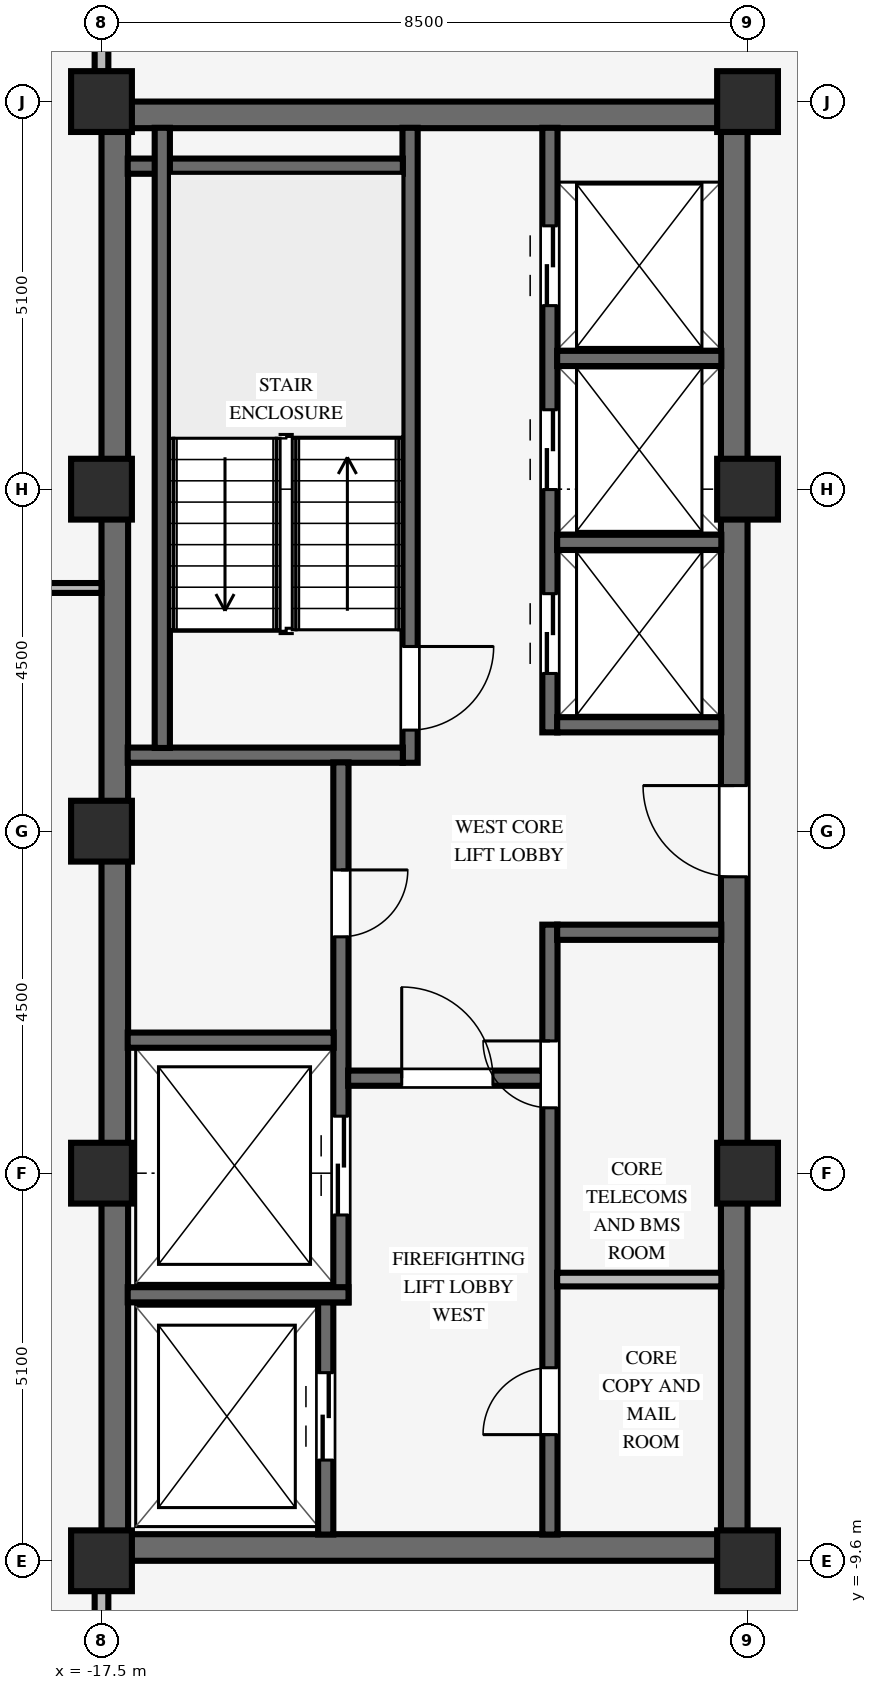
"""IFC4 building model, lengths in metres.
Left out: names, types, materials, properties, quantities, classifications, styles, units other than length and angle.
Written with IfcOpenShell. Run it as: python <this file> out.ifc"""

import sys

from ifc_helpers import new_model, si_unit, direction, frame, frame_2d, origin, origin_2d, place, context, subcontext, project, spatial, rectangle, extrude, source, transform, mapped, element, fill, save


model = new_model("IFC4")
c1 = context("Model", 3, precision=1e-05, world=origin(), true_north=direction((0.0, 1.0)))
c2 = subcontext(c1, "Body", "Model", "MODEL_VIEW")
j1 = project(units=[si_unit("LENGTHUNIT", "METRE"), si_unit("PLANEANGLEUNIT", "RADIAN")], contexts=[c1])
p1 = place(None, origin())
s1 = spatial("IfcSite", under=j1, at=p1, CompositionType="ELEMENT")
p2 = place(p1, origin())
s2 = spatial("IfcBuilding", under=s1, at=p2, CompositionType="ELEMENT")
p3 = place(p2, frame((0.0, 0.0, 242.0)))
s3 = spatial("IfcBuildingStorey", under=s2, at=p3, CompositionType="ELEMENT", Elevation=242.0)
for number, where, z_axis, x_axis in (
    (1, (-17.5, -9.425, 0.0), (0.0, 0.0, 1.0), (1.0, 0.0, 0.0)),
    (2, (-17.5, 9.425, 0.0), (0.0, 0.0, 1.0), (1.0, 0.0, 0.0)),
):
    element("IfcWall", number, at=place(p3, frame(where, z_axis=z_axis, x_axis=x_axis)), inside=s3, PredefinedType="SHEAR", context=c2, shape_type="SweptSolid", body=[
        extrude(rectangle(XDim=8.5, YDim=0.35, at=frame_2d((4.25, 0.0))), origin(), (0.0, 0.0, 1.0), 3.25),
    ])
p4 = place(p3, frame((-17.325, -9.255, 0.0), z_axis=(0.0, 0.0, 1.0), x_axis=(0.0, 1.0, 0.0)))
e3 = element("IfcWall", 3, at=p4, inside=s3, PredefinedType="SHEAR", context=c2, shape_type="SweptSolid", body=[
    extrude(rectangle(XDim=18.51, YDim=0.35, at=frame_2d((9.255, 0.0))), origin(), (0.0, 0.0, 1.0), 3.25),
])
p5 = place(p3, frame((-9.175, -9.255, 0.0), z_axis=(0.0, 0.0, 1.0), x_axis=(0.0, 1.0, 0.0)))
e4 = element("IfcWall", 4, at=p5, inside=s3, PredefinedType="SHEAR", context=c2, shape_type="SweptSolid", body=[
    extrude(rectangle(XDim=18.51, YDim=0.35, at=frame_2d((9.255, 0.0))), origin(), (0.0, 0.0, 1.0), 3.25),
])
p6 = place(p5, frame((8.655, 0.0, 0.0)))
e5 = element("IfcOpeningElement", 5, at=p6, cuts=e4, PredefinedType="OPENING", context=c2, shape_type="SweptSolid", body=[
    extrude(rectangle(XDim=1.2, YDim=2.15, at=frame_2d((0.6, 1.075))), frame((0.0, 0.185, 0.0), z_axis=(0.0, -1.0, 0.0), x_axis=(1.0, 0.0, 0.0)), (0.0, 0.0, 1.0), 0.37),
])
for number, where, z_axis, x_axis in (
    (6, (-17.5, -9.6, 0.0), (0.0, 0.0, 1.0), (1.0, 0.0, 0.0)),
    (7, (-17.5, -4.5, 0.0), (0.0, 0.0, 1.0), (1.0, 0.0, 0.0)),
    (8, (-17.5, 4.5, 0.0), (0.0, 0.0, 1.0), (1.0, 0.0, 0.0)),
    (9, (-17.5, 9.6, 0.0), (0.0, 0.0, 1.0), (1.0, 0.0, 0.0)),
    (10, (-9.0, -9.6, 0.0), (0.0, 0.0, 1.0), (1.0, 0.0, 0.0)),
    (11, (-9.0, -4.5, 0.0), (0.0, 0.0, 1.0), (1.0, 0.0, 0.0)),
    (12, (-9.0, 4.5, 0.0), (0.0, 0.0, 1.0), (1.0, 0.0, 0.0)),
    (13, (-9.0, 9.6, 0.0), (0.0, 0.0, 1.0), (1.0, 0.0, 0.0)),
    (14, (-17.5, 0.0, 0.0), (0.0, 0.0, 1.0), (1.0, 0.0, 0.0)),
):
    element("IfcColumn", number, at=place(p3, frame(where, z_axis=z_axis, x_axis=x_axis)), inside=s3, PredefinedType="COLUMN", context=c2, shape_type="SweptSolid", body=[
        extrude(rectangle(XDim=0.8, YDim=0.8, at=origin_2d()), origin(), (0.0, 0.0, 1.0), 3.25),
    ])
p7 = place(p3, frame((-13.44, 0.9, 0.0), z_axis=(0.0, 0.0, 1.0), x_axis=(0.0, 1.0, 0.0)))
e15 = element("IfcWall", 15, at=p7, inside=s3, PredefinedType="SHEAR", context=c2, shape_type="SweptSolid", body=[
    extrude(rectangle(XDim=8.355, YDim=0.2, at=frame_2d((4.177, 0.0))), origin(), (0.0, 0.0, 1.0), 3.25),
])
p8 = place(p7, frame((1.53, 0.0, 0.0), z_axis=(0.0, 0.0, 1.0), x_axis=(-1.0, 0.0, 0.0)))
e16 = element("IfcOpeningElement", 16, at=p8, cuts=e15, PredefinedType="OPENING", context=c2, shape_type="SweptSolid", body=[
    extrude(rectangle(XDim=1.1, YDim=2.15, at=frame_2d((0.55, 1.075))), frame((0.0, 0.11, 0.0), z_axis=(0.0, -1.0, 0.0), x_axis=(1.0, 0.0, 0.0)), (0.0, 0.0, 1.0), 0.22),
])
for number, where, z_axis, x_axis in (
    (17, (-17.155, 1.0, 0.0), (0.0, 0.0, 1.0), (1.0, 0.0, 0.0)),
    (18, (-17.155, 8.75, 0.0), (0.0, 0.0, 1.0), (1.0, 0.0, 0.0)),
):
    element("IfcWall", number, at=place(p3, frame(where, z_axis=z_axis, x_axis=x_axis)), inside=s3, PredefinedType="SHEAR", context=c2, shape_type="SweptSolid", body=[
        extrude(rectangle(XDim=3.62, YDim=0.2, at=frame_2d((1.81, 0.0))), origin(), (0.0, 0.0, 1.0), 3.25),
    ])
p9 = place(p3, frame((-16.7, 1.095, 0.0), z_axis=(0.0, 0.0, 1.0), x_axis=(0.0, 1.0, 0.0)))
e19 = element("IfcWall", 19, at=p9, inside=s3, PredefinedType="SHEAR", context=c2, shape_type="SweptSolid", body=[
    extrude(rectangle(XDim=8.16, YDim=0.2, at=frame_2d((4.08, 0.0))), origin(), (0.0, 0.0, 1.0), 3.25),
])
p10 = place(p3, frame((-14.55, -9.255, 0.0), z_axis=(0.0, 0.0, 1.0), x_axis=(0.0, 1.0, 0.0)))
e20 = element("IfcWall", 20, at=p10, inside=s3, PredefinedType="SHEAR", context=c2, shape_type="SweptSolid", body=[
    extrude(rectangle(XDim=3.06, YDim=0.2, at=frame_2d((1.53, 0.0))), origin(), (0.0, 0.0, 1.0), 3.25),
])
p11 = place(p10, frame((0.98, 0.0, 0.0)))
e21 = element("IfcOpeningElement", 21, at=p11, cuts=e20, PredefinedType="OPENING", context=c2, shape_type="SweptSolid", body=[
    extrude(rectangle(XDim=1.15, YDim=2.15, at=frame_2d((0.575, 1.075))), frame((0.0, 0.11, 0.0), z_axis=(0.0, -1.0, 0.0), x_axis=(1.0, 0.0, 0.0)), (0.0, 0.0, 1.0), 0.22),
])
p12 = place(p3, frame((-14.35, -6.2, 0.0), z_axis=(0.0, 0.0, 1.0), x_axis=(0.0, 1.0, 0.0)))
e22 = element("IfcWall", 22, at=p12, inside=s3, PredefinedType="SHEAR", context=c2, shape_type="SweptSolid", body=[
    extrude(rectangle(XDim=7.105, YDim=0.2, at=frame_2d((3.552, 0.0))), origin(), (0.0, 0.0, 1.0), 3.25),
])
p13 = place(p12, frame((5.69, 0.0, 0.0), z_axis=(0.0, 0.0, 1.0), x_axis=(-1.0, 0.0, 0.0)))
e23 = element("IfcOpeningElement", 23, at=p13, cuts=e22, PredefinedType="OPENING", context=c2, shape_type="SweptSolid", body=[
    extrude(rectangle(XDim=0.88, YDim=2.1, at=frame_2d((0.44, 1.05))), frame((0.0, 0.11, 0.0), z_axis=(0.0, -1.0, 0.0), x_axis=(1.0, 0.0, 0.0)), (0.0, 0.0, 1.0), 0.22),
])
p14 = place(p12, frame((1.15, 0.0, 0.0)))
e24 = element("IfcOpeningElement", 24, at=p14, cuts=e22, PredefinedType="OPENING", context=c2, shape_type="SweptSolid", body=[
    extrude(rectangle(XDim=1.3, YDim=2.2, at=frame_2d((0.65, 1.1))), frame((0.0, 0.11, 0.0), z_axis=(0.0, -1.0, 0.0), x_axis=(1.0, 0.0, 0.0)), (0.0, 0.0, 1.0), 0.22),
])
p15 = place(p3, frame((-17.155, -6.1, 0.0), z_axis=(0.0, 0.0, 1.0), x_axis=(1.0, 0.0, 0.0)))
e25 = element("IfcWall", 25, at=p15, inside=s3, PredefinedType="SHEAR", context=c2, shape_type="SweptSolid", body=[
    extrude(rectangle(XDim=2.905, YDim=0.2, at=frame_2d((1.453, 0.0))), origin(), (0.0, 0.0, 1.0), 3.25),
])
p16 = place(p3, frame((-17.155, -2.75, 0.0), z_axis=(0.0, 0.0, 1.0), x_axis=(1.0, 0.0, 0.0)))
e26 = element("IfcWall", 26, at=p16, inside=s3, PredefinedType="SHEAR", context=c2, shape_type="SweptSolid", body=[
    extrude(rectangle(XDim=2.71, YDim=0.2, at=frame_2d((1.355, 0.0))), origin(), (0.0, 0.0, 1.0), 3.25),
])
p17 = place(p3, frame((-11.6, -9.255, 0.0), z_axis=(0.0, 0.0, 1.0), x_axis=(0.0, 1.0, 0.0)))
e27 = element("IfcWall", 27, at=p17, inside=s3, PredefinedType="SHEAR", context=c2, shape_type="SweptSolid", body=[
    extrude(rectangle(XDim=8.025, YDim=0.2, at=frame_2d((4.012, 0.0))), origin(), (0.0, 0.0, 1.0), 3.25),
])
p18 = place(p17, frame((1.315, 0.0, 0.0)))
e28 = element("IfcOpeningElement", 28, at=p18, cuts=e27, PredefinedType="OPENING", context=c2, shape_type="SweptSolid", body=[
    extrude(rectangle(XDim=0.88, YDim=2.1, at=frame_2d((0.44, 1.05))), frame((0.0, 0.11, 0.0), z_axis=(0.0, -1.0, 0.0), x_axis=(1.0, 0.0, 0.0)), (0.0, 0.0, 1.0), 0.22),
])
p19 = place(p17, frame((5.615, 0.0, 0.0)))
e29 = element("IfcOpeningElement", 29, at=p19, cuts=e27, PredefinedType="OPENING", context=c2, shape_type="SweptSolid", body=[
    extrude(rectangle(XDim=0.88, YDim=2.1, at=frame_2d((0.44, 1.05))), frame((0.0, 0.11, 0.0), z_axis=(0.0, -1.0, 0.0), x_axis=(1.0, 0.0, 0.0)), (0.0, 0.0, 1.0), 0.22),
])
p20 = place(p3, frame((-14.255, -3.25, 0.0), z_axis=(0.0, 0.0, 1.0), x_axis=(1.0, 0.0, 0.0)))
e30 = element("IfcWall", 30, at=p20, inside=s3, PredefinedType="SHEAR", context=c2, shape_type="SweptSolid", body=[
    extrude(rectangle(XDim=2.56, YDim=0.2, at=frame_2d((1.28, 0.0))), origin(), (0.0, 0.0, 1.0), 3.25),
])
p21 = place(p20, frame((0.705, 0.0, 0.0)))
e31 = element("IfcOpeningElement", 31, at=p21, cuts=e30, PredefinedType="OPENING", context=c2, shape_type="SweptSolid", body=[
    extrude(rectangle(XDim=1.2, YDim=2.15, at=frame_2d((0.6, 1.075))), frame((0.0, 0.11, 0.0), z_axis=(0.0, -1.0, 0.0), x_axis=(1.0, 0.0, 0.0)), (0.0, 0.0, 1.0), 0.22),
])
p22 = place(p3, frame((-11.505, -1.33, 0.0), z_axis=(0.0, 0.0, 1.0), x_axis=(1.0, 0.0, 0.0)))
e32 = element("IfcWall", 32, at=p22, inside=s3, PredefinedType="SHEAR", context=c2, shape_type="SweptSolid", body=[
    extrude(rectangle(XDim=2.16, YDim=0.2, at=frame_2d((1.08, 0.0))), origin(), (0.0, 0.0, 1.0), 3.25),
])
p23 = place(p3, frame((-11.505, -5.9, 0.0), z_axis=(0.0, 0.0, 1.0), x_axis=(1.0, 0.0, 0.0)))
e33 = element("IfcWall", 33, at=p23, inside=s3, PredefinedType="PARTITIONING", context=c2, shape_type="SweptSolid", body=[
    extrude(rectangle(XDim=2.16, YDim=0.18, at=frame_2d((1.08, 0.0))), origin(), (0.0, 0.0, 1.0), 3.24),
])
p24 = place(p3, frame((-11.6, 1.3, 0.0), z_axis=(0.0, 0.0, 1.0), x_axis=(0.0, 1.0, 0.0)))
e34 = element("IfcWall", 34, at=p24, inside=s3, PredefinedType="SHEAR", context=c2, shape_type="SweptSolid", body=[
    extrude(rectangle(XDim=7.955, YDim=0.2, at=frame_2d((3.978, 0.0))), origin(), (0.0, 0.0, 1.0), 3.25),
])
p25 = place(p24, frame((0.775, 0.0, 0.0)))
e35 = element("IfcOpeningElement", 35, at=p25, cuts=e34, PredefinedType="OPENING", context=c2, shape_type="SweptSolid", body=[
    extrude(rectangle(XDim=1.05, YDim=2.15, at=frame_2d((0.525, 1.075))), frame((0.0, 0.11, 0.0), z_axis=(0.0, -1.0, 0.0), x_axis=(1.0, 0.0, 0.0)), (0.0, 0.0, 1.0), 0.22),
])
p26 = place(p24, frame((3.195, 0.0, 0.0)))
e36 = element("IfcOpeningElement", 36, at=p26, cuts=e34, PredefinedType="OPENING", context=c2, shape_type="SweptSolid", body=[
    extrude(rectangle(XDim=1.05, YDim=2.15, at=frame_2d((0.525, 1.075))), frame((0.0, 0.11, 0.0), z_axis=(0.0, -1.0, 0.0), x_axis=(1.0, 0.0, 0.0)), (0.0, 0.0, 1.0), 0.22),
])
p27 = place(p24, frame((5.615, 0.0, 0.0)))
e37 = element("IfcOpeningElement", 37, at=p27, cuts=e34, PredefinedType="OPENING", context=c2, shape_type="SweptSolid", body=[
    extrude(rectangle(XDim=1.05, YDim=2.15, at=frame_2d((0.525, 1.075))), frame((0.0, 0.11, 0.0), z_axis=(0.0, -1.0, 0.0), x_axis=(1.0, 0.0, 0.0)), (0.0, 0.0, 1.0), 0.22),
])
for number, where, z_axis, x_axis in (
    (38, (-11.505, 1.4, 0.0), (0.0, 0.0, 1.0), (1.0, 0.0, 0.0)),
    (39, (-11.505, 3.8, 0.0), (0.0, 0.0, 1.0), (1.0, 0.0, 0.0)),
    (40, (-11.505, 6.22, 0.0), (0.0, 0.0, 1.0), (1.0, 0.0, 0.0)),
):
    element("IfcWall", number, at=place(p3, frame(where, z_axis=z_axis, x_axis=x_axis)), inside=s3, PredefinedType="SHEAR", context=c2, shape_type="SweptSolid", body=[
        extrude(rectangle(XDim=2.16, YDim=0.2, at=frame_2d((1.08, 0.0))), origin(), (0.0, 0.0, 1.0), 3.25),
    ])
p28 = place(p3, frame((-26.1, 3.2, 0.0), z_axis=(0.0, 0.0, 1.0), x_axis=(1.0, 0.0, 0.0)))
e41 = element("IfcWall", 41, at=p28, inside=s3, PredefinedType="PARTITIONING", context=c2, shape_type="SweptSolid", body=[
    extrude(rectangle(XDim=8.6, YDim=0.13, at=frame_2d((4.3, 0.0))), origin(), (0.0, 0.0, 1.0), 3.24),
])
for number, where, z_axis, x_axis in (
    (42, (-17.5, -11.114, 0.0), (0.0, 0.0, 1.0), (0.0, 1.0, 0.0)),
    (43, (-17.5, 9.996, 0.0), (0.0, 0.0, 1.0), (0.0, 1.0, 0.0)),
):
    element("IfcWall", number, at=place(p3, frame(where, z_axis=z_axis, x_axis=x_axis)), inside=s3, PredefinedType="PARTITIONING", context=c2, shape_type="SweptSolid", body=[
        extrude(rectangle(XDim=1.118, YDim=0.18, at=frame_2d((0.559, 0.0))), origin(), (0.0, 0.0, 1.0), 2.772),
    ])
m1 = source(origin(), c2, "Body", "SweptSolid", [
    extrude(rectangle(XDim=1.1, YDim=2.15, at=frame_2d((0.55, 1.075))), frame((0.0, 0.025, 0.0), z_axis=(0.0, -1.0, 0.0), x_axis=(1.0, 0.0, 0.0)), (0.0, 0.0, 1.0), 0.05),
])
p29 = place(p8, origin())
e44 = element("IfcDoor", 44, at=p29, inside=s3, OperationType="SINGLE_SWING_LEFT", PredefinedType="DOOR", context=c2, shape_type="MappedRepresentation", body=[
    mapped(m1, transform((0.0, 0.0, 0.0), scale=1.0)),
])
fill(e16, e44)
m2 = source(origin(), c2, "Body", "SweptSolid", [
    extrude(rectangle(XDim=0.88, YDim=2.1, at=frame_2d((0.44, 1.05))), frame((0.0, 0.025, 0.0), z_axis=(0.0, -1.0, 0.0), x_axis=(1.0, 0.0, 0.0)), (0.0, 0.0, 1.0), 0.05),
])
p30 = place(p13, origin())
e45 = element("IfcDoor", 45, at=p30, inside=s3, OperationType="SINGLE_SWING_LEFT", PredefinedType="DOOR", context=c2, shape_type="MappedRepresentation", body=[
    mapped(m2, transform((0.0, 0.0, 0.0), scale=1.0)),
])
fill(e23, e45)
m3 = source(origin(), c2, "Body", "SweptSolid", [
    extrude(rectangle(XDim=1.2, YDim=2.15, at=frame_2d((0.6, 1.075))), frame((0.0, 0.025, 0.0), z_axis=(0.0, -1.0, 0.0), x_axis=(1.0, 0.0, 0.0)), (0.0, 0.0, 1.0), 0.05),
])
p31 = place(p21, origin())
e46 = element("IfcDoor", 46, at=p31, inside=s3, OperationType="SINGLE_SWING_LEFT", PredefinedType="DOOR", context=c2, shape_type="MappedRepresentation", body=[
    mapped(m3, transform((0.0, 0.0, 0.0), scale=1.0)),
])
fill(e31, e46)
p32 = place(p18, origin())
e47 = element("IfcDoor", 47, at=p32, inside=s3, OperationType="SINGLE_SWING_LEFT", PredefinedType="DOOR", context=c2, shape_type="MappedRepresentation", body=[
    mapped(m2, transform((0.0, 0.0, 0.0), scale=1.0)),
])
fill(e28, e47)
p33 = place(p19, origin())
e48 = element("IfcDoor", 48, at=p33, inside=s3, OperationType="SINGLE_SWING_RIGHT", PredefinedType="DOOR", context=c2, shape_type="MappedRepresentation", body=[
    mapped(m2, transform((0.0, 0.0, 0.0), scale=1.0)),
])
fill(e29, e48)
p34 = place(p6, origin())
e49 = element("IfcDoor", 49, at=p34, inside=s3, OperationType="SINGLE_SWING_RIGHT", PredefinedType="DOOR", context=c2, shape_type="MappedRepresentation", body=[
    mapped(m3, transform((0.0, 0.0, 0.0), scale=1.0)),
])
fill(e5, e49)
m4 = source(origin(), c2, "Body", "SweptSolid", [
    extrude(rectangle(XDim=1.15, YDim=2.15, at=frame_2d((0.575, 1.075))), frame((0.0, 0.025, 0.0), z_axis=(0.0, -1.0, 0.0), x_axis=(1.0, 0.0, 0.0)), (0.0, 0.0, 1.0), 0.05),
])
p35 = place(p11, origin())
e50 = element("IfcDoor", 50, at=p35, inside=s3, OperationType="DOUBLE_DOOR_SLIDING", PredefinedType="DOOR", context=c2, shape_type="MappedRepresentation", body=[
    mapped(m4, transform((0.0, 0.0, 0.0), scale=1.0)),
])
fill(e21, e50)
m5 = source(origin(), c2, "Body", "SweptSolid", [
    extrude(rectangle(XDim=1.3, YDim=2.2, at=frame_2d((0.65, 1.1))), frame((0.0, 0.025, 0.0), z_axis=(0.0, -1.0, 0.0), x_axis=(1.0, 0.0, 0.0)), (0.0, 0.0, 1.0), 0.05),
])
p36 = place(p14, origin())
e51 = element("IfcDoor", 51, at=p36, inside=s3, OperationType="DOUBLE_DOOR_SLIDING", PredefinedType="DOOR", context=c2, shape_type="MappedRepresentation", body=[
    mapped(m5, transform((0.0, 0.0, 0.0), scale=1.0)),
])
fill(e24, e51)
m6 = source(origin(), c2, "Body", "SweptSolid", [
    extrude(rectangle(XDim=1.05, YDim=2.15, at=frame_2d((0.525, 1.075))), frame((0.0, 0.025, 0.0), z_axis=(0.0, -1.0, 0.0), x_axis=(1.0, 0.0, 0.0)), (0.0, 0.0, 1.0), 0.05),
])
p37 = place(p25, origin())
e52 = element("IfcDoor", 52, at=p37, inside=s3, OperationType="DOUBLE_DOOR_SLIDING", PredefinedType="DOOR", context=c2, shape_type="MappedRepresentation", body=[
    mapped(m6, transform((0.0, 0.0, 0.0), scale=1.0)),
])
fill(e35, e52)
p38 = place(p26, origin())
e53 = element("IfcDoor", 53, at=p38, inside=s3, OperationType="DOUBLE_DOOR_SLIDING", PredefinedType="DOOR", context=c2, shape_type="MappedRepresentation", body=[
    mapped(m6, transform((0.0, 0.0, 0.0), scale=1.0)),
])
fill(e36, e53)
p39 = place(p27, origin())
e54 = element("IfcDoor", 54, at=p39, inside=s3, OperationType="DOUBLE_DOOR_SLIDING", PredefinedType="DOOR", context=c2, shape_type="MappedRepresentation", body=[
    mapped(m6, transform((0.0, 0.0, 0.0), scale=1.0)),
])
fill(e37, e54)
save(model, sys.argv[1])
